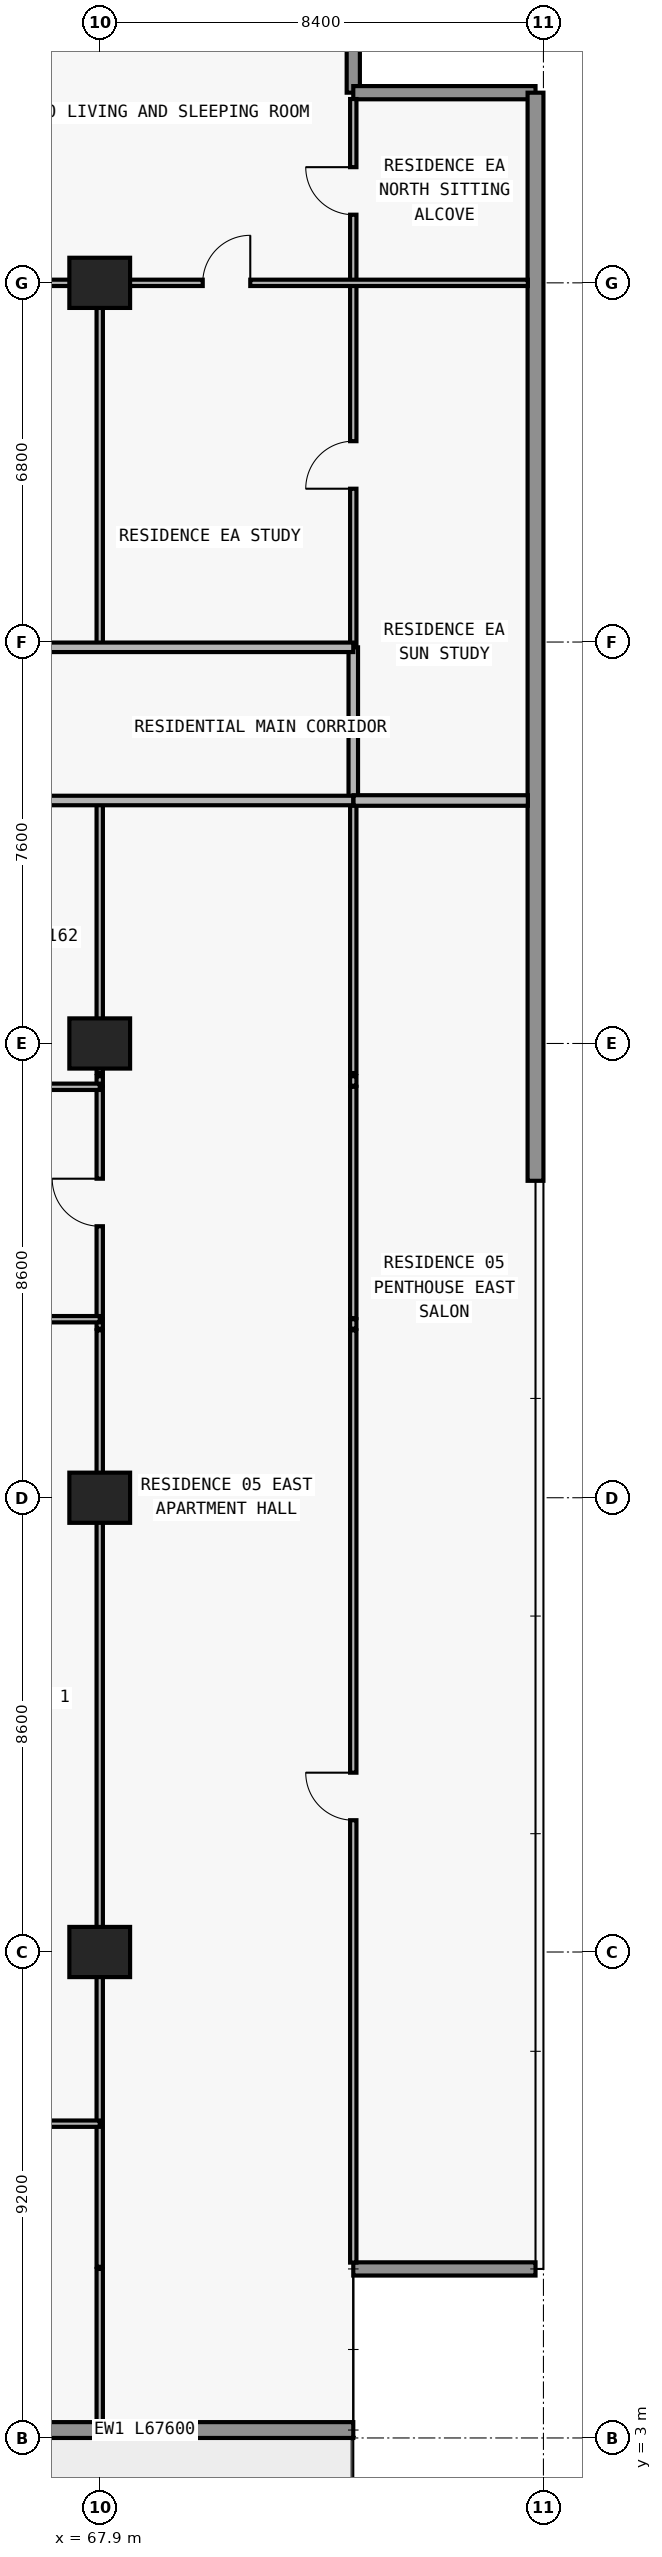
"""IFC4 building model, lengths in metres.
Left out: names, types, materials, properties, quantities, classifications, styles, units other than length and angle.
Written with IfcOpenShell. Run it as: python <this file> out.ifc"""

import sys

from ifc_helpers import new_model, si_unit, direction, frame, frame_2d, origin, origin_2d, place, context, subcontext, project, spatial, rectangle, extrude, element, fill, save


model = new_model("IFC4")
c1 = context("Model", 3, precision=1e-05, world=origin(), true_north=direction((0.0, 1.0)))
c2 = subcontext(c1, "Body", "Model", "MODEL_VIEW")
j1 = project(units=[si_unit("LENGTHUNIT", "METRE"), si_unit("PLANEANGLEUNIT", "RADIAN")], contexts=[c1])
p1 = place(None, origin())
s1 = spatial("IfcSite", under=j1, at=p1, CompositionType="ELEMENT")
p2 = place(p1, origin())
s2 = spatial("IfcBuilding", under=s1, at=p2, CompositionType="ELEMENT")
p3 = place(p2, frame((0.0, 0.0, 43.2)))
s3 = spatial("IfcBuildingStorey", under=s2, at=p3, CompositionType="ELEMENT", Elevation=43.2)
for number, where, z_axis, x_axis in (
    (1, (67.9, 12.2, 0.0), (0.0, 0.0, 1.0), (1.0, 0.0, 0.0)),
    (2, (67.9, 20.8, 0.0), (0.0, 0.0, 1.0), (1.0, 0.0, 0.0)),
    (3, (67.9, 29.4, 0.0), (0.0, 0.0, 1.0), (1.0, 0.0, 0.0)),
    (4, (67.9, 43.8, 0.0), (0.0, 0.0, 1.0), (1.0, 0.0, 0.0)),
):
    element("IfcColumn", number, at=place(p3, frame(where, z_axis=z_axis, x_axis=x_axis)), inside=s3, PredefinedType="COLUMN", context=c2, shape_type="SweptSolid", body=[
        extrude(rectangle(XDim=1.15, YDim=0.95, at=origin_2d()), origin(), (0.0, 0.0, 1.0), 3.05),
    ])
p4 = place(p3, frame((72.7, 3.15, 0.0), z_axis=(0.0, 0.0, 1.0), x_axis=(-1.0, 0.0, 0.0)))
e5 = element("IfcWall", 5, at=p4, inside=s3, PredefinedType="STANDARD", context=c2, shape_type="SweptSolid", body=[
    extrude(rectangle(XDim=67.6, YDim=0.3, at=frame_2d((33.8, 0.0))), origin(), (0.0, 0.0, 1.0), 3.05),
])
p5 = place(p4, frame((59.89, 0.0, 0.0)))
e6 = element("IfcOpeningElement", 6, at=p5, cuts=e5, PredefinedType="OPENING", context=c2, shape_type="SweptSolid", body=[
    extrude(rectangle(XDim=2.0, YDim=2.3, at=frame_2d((1.0, 1.15))), frame((0.0, 0.16, 0.0), z_axis=(0.0, -1.0, 0.0), x_axis=(1.0, 0.0, 0.0)), (0.0, 0.0, 1.0), 0.32),
])
p6 = place(p4, frame((55.21, 0.0, 0.65)))
e7 = element("IfcOpeningElement", 7, at=p6, cuts=e5, PredefinedType="OPENING", context=c2, shape_type="SweptSolid", body=[
    extrude(rectangle(XDim=2.6, YDim=1.85, at=frame_2d((1.3, 0.925))), frame((0.0, 0.16, 0.0), z_axis=(0.0, -1.0, 0.0), x_axis=(1.0, 0.0, 0.0)), (0.0, 0.0, 1.0), 0.32),
])
p7 = place(p4, frame((49.1, 0.0, 0.85)))
e8 = element("IfcOpeningElement", 8, at=p7, cuts=e5, PredefinedType="OPENING", context=c2, shape_type="SweptSolid", body=[
    extrude(rectangle(XDim=2.2, YDim=1.55, at=frame_2d((1.1, 0.775))), frame((0.0, 0.16, 0.0), z_axis=(0.0, -1.0, 0.0), x_axis=(1.0, 0.0, 0.0)), (0.0, 0.0, 1.0), 0.32),
])
p8 = place(p4, frame((42.69, 0.0, 0.0)))
e9 = element("IfcOpeningElement", 9, at=p8, cuts=e5, PredefinedType="OPENING", context=c2, shape_type="SweptSolid", body=[
    extrude(rectangle(XDim=2.0, YDim=2.3, at=frame_2d((1.0, 1.15))), frame((0.0, 0.16, 0.0), z_axis=(0.0, -1.0, 0.0), x_axis=(1.0, 0.0, 0.0)), (0.0, 0.0, 1.0), 0.32),
])
p9 = place(p4, frame((38.59, 0.0, 0.85)))
e10 = element("IfcOpeningElement", 10, at=p9, cuts=e5, PredefinedType="OPENING", context=c2, shape_type="SweptSolid", body=[
    extrude(rectangle(XDim=1.8, YDim=1.55, at=frame_2d((0.9, 0.775))), frame((0.0, 0.16, 0.0), z_axis=(0.0, -1.0, 0.0), x_axis=(1.0, 0.0, 0.0)), (0.0, 0.0, 1.0), 0.32),
])
p10 = place(p4, frame((30.914, 0.0, 0.85)))
e11 = element("IfcOpeningElement", 11, at=p10, cuts=e5, PredefinedType="OPENING", context=c2, shape_type="SweptSolid", body=[
    extrude(rectangle(XDim=2.2, YDim=1.55, at=frame_2d((1.1, 0.775))), frame((0.0, 0.16, 0.0), z_axis=(0.0, -1.0, 0.0), x_axis=(1.0, 0.0, 0.0)), (0.0, 0.0, 1.0), 0.32),
])
p11 = place(p4, frame((26.69, 0.0, 0.0)))
e12 = element("IfcOpeningElement", 12, at=p11, cuts=e5, PredefinedType="OPENING", context=c2, shape_type="SweptSolid", body=[
    extrude(rectangle(XDim=2.0, YDim=2.3, at=frame_2d((1.0, 1.15))), frame((0.0, 0.16, 0.0), z_axis=(0.0, -1.0, 0.0), x_axis=(1.0, 0.0, 0.0)), (0.0, 0.0, 1.0), 0.32),
])
p12 = place(p4, frame((22.59, 0.0, 0.85)))
e13 = element("IfcOpeningElement", 13, at=p12, cuts=e5, PredefinedType="OPENING", context=c2, shape_type="SweptSolid", body=[
    extrude(rectangle(XDim=1.8, YDim=1.55, at=frame_2d((0.9, 0.775))), frame((0.0, 0.16, 0.0), z_axis=(0.0, -1.0, 0.0), x_axis=(1.0, 0.0, 0.0)), (0.0, 0.0, 1.0), 0.32),
])
p13 = place(p4, frame((18.69, 0.0, 0.0)))
e14 = element("IfcOpeningElement", 14, at=p13, cuts=e5, PredefinedType="OPENING", context=c2, shape_type="SweptSolid", body=[
    extrude(rectangle(XDim=2.0, YDim=2.3, at=frame_2d((1.0, 1.15))), frame((0.0, 0.16, 0.0), z_axis=(0.0, -1.0, 0.0), x_axis=(1.0, 0.0, 0.0)), (0.0, 0.0, 1.0), 0.32),
])
p14 = place(p4, frame((14.01, 0.0, 0.65)))
e15 = element("IfcOpeningElement", 15, at=p14, cuts=e5, PredefinedType="OPENING", context=c2, shape_type="SweptSolid", body=[
    extrude(rectangle(XDim=2.6, YDim=1.85, at=frame_2d((1.3, 0.925))), frame((0.0, 0.16, 0.0), z_axis=(0.0, -1.0, 0.0), x_axis=(1.0, 0.0, 0.0)), (0.0, 0.0, 1.0), 0.32),
])
p15 = place(p4, frame((7.9, 0.0, 0.85)))
e16 = element("IfcOpeningElement", 16, at=p15, cuts=e5, PredefinedType="OPENING", context=c2, shape_type="SweptSolid", body=[
    extrude(rectangle(XDim=2.2, YDim=1.55, at=frame_2d((1.1, 0.775))), frame((0.0, 0.16, 0.0), z_axis=(0.0, -1.0, 0.0), x_axis=(1.0, 0.0, 0.0)), (0.0, 0.0, 1.0), 0.32),
])
p16 = place(p3, frame((72.7, 6.2, 0.0), z_axis=(0.0, 0.0, 1.0), x_axis=(1.0, 0.0, 0.0)))
e17 = element("IfcWall", 17, at=p16, inside=s3, PredefinedType="ELEMENTEDWALL", context=c2, shape_type="SweptSolid", body=[
    extrude(rectangle(XDim=3.45, YDim=0.25, at=frame_2d((1.725, 0.0))), origin(), (0.0, 0.0, 1.0), 3.05),
])
p17 = place(p3, frame((72.7, 50.45, 0.0), z_axis=(0.0, 0.0, 1.0), x_axis=(0.0, -1.0, 0.0)))
e18 = element("IfcWall", 18, at=p17, inside=s3, PredefinedType="ELEMENTEDWALL", context=c2, shape_type="SweptSolid", body=[
    extrude(rectangle(XDim=3.05, YDim=0.25, at=frame_2d((1.525, 0.0))), origin(), (0.0, 0.0, 1.0), 3.05),
])
p18 = place(p3, frame((72.7, 47.4, 0.0), z_axis=(0.0, 0.0, 1.0), x_axis=(1.0, 0.0, 0.0)))
e19 = element("IfcWall", 19, at=p18, inside=s3, PredefinedType="ELEMENTEDWALL", context=c2, shape_type="SweptSolid", body=[
    extrude(rectangle(XDim=3.45, YDim=0.25, at=frame_2d((1.725, 0.0))), origin(), (0.0, 0.0, 1.0), 3.05),
])
p19 = place(p3, frame((76.15, 47.4, 0.0), z_axis=(0.0, 0.0, 1.0), x_axis=(0.0, -1.0, 0.0)))
e20 = element("IfcWall", 20, at=p19, inside=s3, PredefinedType="STANDARD", context=c2, shape_type="SweptSolid", body=[
    extrude(rectangle(XDim=20.6, YDim=0.3, at=frame_2d((10.3, 0.0))), origin(), (0.0, 0.0, 1.0), 3.05),
])
p20 = place(p3, frame((67.9, 3.295, 0.0), z_axis=(0.0, 0.0, 1.0), x_axis=(0.0, 1.0, 0.0)))
e21 = element("IfcWall", 21, at=p20, inside=s3, PredefinedType="PARTITIONING", context=c2, shape_type="SweptSolid", body=[
    extrude(rectangle(XDim=2.905, YDim=0.12, at=frame_2d((1.453, 0.0))), origin(), (0.0, 0.0, 1.0), 3.05),
])
p21 = place(p3, frame((67.9, 6.24, 0.0), z_axis=(0.0, 0.0, 1.0), x_axis=(0.0, 1.0, 0.0)))
e22 = element("IfcWall", 22, at=p21, inside=s3, PredefinedType="PARTITIONING", context=c2, shape_type="SweptSolid", body=[
    extrude(rectangle(XDim=17.73, YDim=0.12, at=frame_2d((8.865, 0.0))), origin(), (0.0, 0.0, 1.0), 2.11),
])
p22 = place(p3, frame((67.9, 24.0, 0.0), z_axis=(0.0, 0.0, 1.0), x_axis=(0.0, 1.0, 0.0)))
e23 = element("IfcWall", 23, at=p22, inside=s3, PredefinedType="PARTITIONING", context=c2, shape_type="SweptSolid", body=[
    extrude(rectangle(XDim=0.18, YDim=0.12, at=frame_2d((0.09, 0.0))), origin(), (0.0, 0.0, 1.0), 2.11),
])
p23 = place(p3, frame((67.9, 24.2, 0.0), z_axis=(0.0, 0.0, 1.0), x_axis=(0.0, 1.0, 0.0)))
e24 = element("IfcWall", 24, at=p23, inside=s3, PredefinedType="PARTITIONING", context=c2, shape_type="SweptSolid", body=[
    extrude(rectangle(XDim=4.38, YDim=0.12, at=frame_2d((2.19, 0.0))), origin(), (0.0, 0.0, 1.0), 2.11),
])
p24 = place(p23, frame((1.74, 0.0, 0.0)))
e25 = element("IfcOpeningElement", 25, at=p24, cuts=e24, PredefinedType="OPENING", context=c2, shape_type="SweptSolid", body=[
    extrude(rectangle(XDim=0.9, YDim=2.06, at=frame_2d((0.45, 1.03))), frame((0.0, 0.07, 0.0), z_axis=(0.0, -1.0, 0.0), x_axis=(1.0, 0.0, 0.0)), (0.0, 0.0, 1.0), 0.14),
])
p25 = place(p3, frame((67.9, 28.6, 0.0), z_axis=(0.0, 0.0, 1.0), x_axis=(0.0, 1.0, 0.0)))
e26 = element("IfcWall", 26, at=p25, inside=s3, PredefinedType="PARTITIONING", context=c2, shape_type="SweptSolid", body=[
    extrude(rectangle(XDim=0.18, YDim=0.12, at=frame_2d((0.09, 0.0))), origin(), (0.0, 0.0, 1.0), 2.11),
])
p26 = place(p3, frame((67.9, 28.84, 0.0), z_axis=(0.0, 0.0, 1.0), x_axis=(0.0, 1.0, 0.0)))
e27 = element("IfcWall", 27, at=p26, inside=s3, PredefinedType="PARTITIONING", context=c2, shape_type="SweptSolid", body=[
    extrude(rectangle(XDim=5.16, YDim=0.12, at=frame_2d((2.58, 0.0))), origin(), (0.0, 0.0, 1.0), 2.11),
])
p27 = place(p3, frame((67.9, 36.9, 0.0), z_axis=(0.0, 0.0, 1.0), x_axis=(0.0, 1.0, 0.0)))
e28 = element("IfcWall", 28, at=p27, inside=s3, PredefinedType="PARTITIONING", context=c2, shape_type="SweptSolid", body=[
    extrude(rectangle(XDim=6.9, YDim=0.12, at=frame_2d((3.45, 0.0))), origin(), (0.0, 0.0, 1.0), 2.11),
])
p28 = place(p3, frame((72.7, 6.32, 0.0), z_axis=(0.0, 0.0, 1.0), x_axis=(0.0, 1.0, 0.0)))
e29 = element("IfcWall", 29, at=p28, inside=s3, PredefinedType="PARTITIONING", context=c2, shape_type="SweptSolid", body=[
    extrude(rectangle(XDim=17.65, YDim=0.12, at=frame_2d((8.825, 0.0))), origin(), (0.0, 0.0, 1.0), 3.05),
])
p29 = place(p28, frame((8.375, 0.0, 0.0)))
e30 = element("IfcOpeningElement", 30, at=p29, cuts=e29, PredefinedType="OPENING", context=c2, shape_type="SweptSolid", body=[
    extrude(rectangle(XDim=0.9, YDim=2.15, at=frame_2d((0.45, 1.075))), frame((0.0, 0.07, 0.0), z_axis=(0.0, -1.0, 0.0), x_axis=(1.0, 0.0, 0.0)), (0.0, 0.0, 1.0), 0.14),
])
p30 = place(p3, frame((72.7, 24.0, 0.0), z_axis=(0.0, 0.0, 1.0), x_axis=(0.0, 1.0, 0.0)))
e31 = element("IfcWall", 31, at=p30, inside=s3, PredefinedType="PARTITIONING", context=c2, shape_type="SweptSolid", body=[
    extrude(rectangle(XDim=0.18, YDim=0.12, at=frame_2d((0.09, 0.0))), origin(), (0.0, 0.0, 1.0), 3.05),
])
p31 = place(p3, frame((72.7, 24.2, 0.0), z_axis=(0.0, 0.0, 1.0), x_axis=(0.0, 1.0, 0.0)))
e32 = element("IfcWall", 32, at=p31, inside=s3, PredefinedType="PARTITIONING", context=c2, shape_type="SweptSolid", body=[
    extrude(rectangle(XDim=4.38, YDim=0.12, at=frame_2d((2.19, 0.0))), origin(), (0.0, 0.0, 1.0), 3.05),
])
p32 = place(p3, frame((72.7, 28.6, 0.0), z_axis=(0.0, 0.0, 1.0), x_axis=(0.0, 1.0, 0.0)))
e33 = element("IfcWall", 33, at=p32, inside=s3, PredefinedType="PARTITIONING", context=c2, shape_type="SweptSolid", body=[
    extrude(rectangle(XDim=0.18, YDim=0.12, at=frame_2d((0.09, 0.0))), origin(), (0.0, 0.0, 1.0), 3.05),
])
p33 = place(p3, frame((72.7, 28.84, 0.0), z_axis=(0.0, 0.0, 1.0), x_axis=(0.0, 1.0, 0.0)))
e34 = element("IfcWall", 34, at=p33, inside=s3, PredefinedType="PARTITIONING", context=c2, shape_type="SweptSolid", body=[
    extrude(rectangle(XDim=5.16, YDim=0.12, at=frame_2d((2.58, 0.0))), origin(), (0.0, 0.0, 1.0), 3.05),
])
p34 = place(p3, frame((72.7, 34.005, 0.0), z_axis=(0.0, 0.0, 1.0), x_axis=(0.0, 1.0, 0.0)))
e35 = element("IfcWall", 35, at=p34, inside=s3, PredefinedType="PARTITIONING", context=c2, shape_type="SweptSolid", body=[
    extrude(rectangle(XDim=2.895, YDim=0.18, at=frame_2d((1.448, 0.0))), origin(), (0.0, 0.0, 1.0), 3.05),
])
p35 = place(p3, frame((72.7, 36.905, 0.0), z_axis=(0.0, 0.0, 1.0), x_axis=(0.0, 1.0, 0.0)))
e36 = element("IfcWall", 36, at=p35, inside=s3, PredefinedType="PARTITIONING", context=c2, shape_type="SweptSolid", body=[
    extrude(rectangle(XDim=10.375, YDim=0.12, at=frame_2d((5.188, 0.0))), origin(), (0.0, 0.0, 1.0), 3.05),
])
p36 = place(p35, frame((2.998, 0.0, 0.0)))
e37 = element("IfcOpeningElement", 37, at=p36, cuts=e36, PredefinedType="OPENING", context=c2, shape_type="SweptSolid", body=[
    extrude(rectangle(XDim=0.9, YDim=2.15, at=frame_2d((0.45, 1.075))), frame((0.0, 0.07, 0.0), z_axis=(0.0, -1.0, 0.0), x_axis=(1.0, 0.0, 0.0)), (0.0, 0.0, 1.0), 0.14),
])
p37 = place(p35, frame((8.185, 0.0, 0.0)))
e38 = element("IfcOpeningElement", 38, at=p37, cuts=e36, PredefinedType="OPENING", context=c2, shape_type="SweptSolid", body=[
    extrude(rectangle(XDim=0.9, YDim=2.15, at=frame_2d((0.45, 1.075))), frame((0.0, 0.07, 0.0), z_axis=(0.0, -1.0, 0.0), x_axis=(1.0, 0.0, 0.0)), (0.0, 0.0, 1.0), 0.14),
])
p38 = place(p3, frame((59.5, 8.95, 0.0), z_axis=(0.0, 0.0, 1.0), x_axis=(1.0, 0.0, 0.0)))
e39 = element("IfcWall", 39, at=p38, inside=s3, PredefinedType="PARTITIONING", context=c2, shape_type="SweptSolid", body=[
    extrude(rectangle(XDim=8.4, YDim=0.12, at=frame_2d((4.2, 0.0))), origin(), (0.0, 0.0, 1.0), 3.05),
])
p39 = place(p38, frame((3.75, 0.0, 0.0)))
e40 = element("IfcOpeningElement", 40, at=p39, cuts=e39, PredefinedType="OPENING", context=c2, shape_type="SweptSolid", body=[
    extrude(rectangle(XDim=0.9, YDim=2.15, at=frame_2d((0.45, 1.075))), frame((0.0, 0.07, 0.0), z_axis=(0.0, -1.0, 0.0), x_axis=(1.0, 0.0, 0.0)), (0.0, 0.0, 1.0), 0.14),
])
p40 = place(p3, frame((59.505, 24.18, 0.0), z_axis=(0.0, 0.0, 1.0), x_axis=(1.0, 0.0, 0.0)))
e41 = element("IfcWall", 41, at=p40, inside=s3, PredefinedType="PARTITIONING", context=c2, shape_type="SweptSolid", body=[
    extrude(rectangle(XDim=8.395, YDim=0.12, at=frame_2d((4.198, 0.0))), origin(), (0.0, 0.0, 1.0), 3.05),
])
p41 = place(p40, frame((3.748, 0.0, 0.0)))
e42 = element("IfcOpeningElement", 42, at=p41, cuts=e41, PredefinedType="OPENING", context=c2, shape_type="SweptSolid", body=[
    extrude(rectangle(XDim=0.9, YDim=2.15, at=frame_2d((0.45, 1.075))), frame((0.0, 0.07, 0.0), z_axis=(0.0, -1.0, 0.0), x_axis=(1.0, 0.0, 0.0)), (0.0, 0.0, 1.0), 0.14),
])
p42 = place(p3, frame((59.5, 28.58, 0.0), z_axis=(0.0, 0.0, 1.0), x_axis=(1.0, 0.0, 0.0)))
e43 = element("IfcWall", 43, at=p42, inside=s3, PredefinedType="PARTITIONING", context=c2, shape_type="SweptSolid", body=[
    extrude(rectangle(XDim=8.4, YDim=0.12, at=frame_2d((4.2, 0.0))), origin(), (0.0, 0.0, 1.0), 3.05),
])
p43 = place(p42, frame((2.865, 0.0, 0.0)))
e44 = element("IfcOpeningElement", 44, at=p43, cuts=e43, PredefinedType="OPENING", context=c2, shape_type="SweptSolid", body=[
    extrude(rectangle(XDim=0.9, YDim=2.15, at=frame_2d((0.45, 1.075))), frame((0.0, 0.07, 0.0), z_axis=(0.0, -1.0, 0.0), x_axis=(1.0, 0.0, 0.0)), (0.0, 0.0, 1.0), 0.14),
])
p44 = place(p3, frame((31.4, 34.0, 0.0), z_axis=(0.0, 0.0, 1.0), x_axis=(1.0, 0.0, 0.0)))
e45 = element("IfcWall", 45, at=p44, inside=s3, PredefinedType="PARTITIONING", context=c2, shape_type="SweptSolid", body=[
    extrude(rectangle(XDim=41.3, YDim=0.18, at=frame_2d((20.65, 0.0))), origin(), (0.0, 0.0, 1.0), 3.05),
])
p45 = place(p44, frame((6.07, 0.0, 0.0)))
e46 = element("IfcOpeningElement", 46, at=p45, cuts=e45, PredefinedType="OPENING", context=c2, shape_type="SweptSolid", body=[
    extrude(rectangle(XDim=1.0, YDim=2.2, at=frame_2d((0.5, 1.1))), frame((0.0, 0.1, 0.0), z_axis=(0.0, -1.0, 0.0), x_axis=(1.0, 0.0, 0.0)), (0.0, 0.0, 1.0), 0.2),
])
p46 = place(p44, frame((13.945, 0.0, 0.0)))
e47 = element("IfcOpeningElement", 47, at=p46, cuts=e45, PredefinedType="OPENING", context=c2, shape_type="SweptSolid", body=[
    extrude(rectangle(XDim=1.0, YDim=2.2, at=frame_2d((0.5, 1.1))), frame((0.0, 0.1, 0.0), z_axis=(0.0, -1.0, 0.0), x_axis=(1.0, 0.0, 0.0)), (0.0, 0.0, 1.0), 0.2),
])
p47 = place(p44, frame((22.414, 0.0, 0.0)))
e48 = element("IfcOpeningElement", 48, at=p47, cuts=e45, PredefinedType="OPENING", context=c2, shape_type="SweptSolid", body=[
    extrude(rectangle(XDim=1.0, YDim=2.2, at=frame_2d((0.5, 1.1))), frame((0.0, 0.1, 0.0), z_axis=(0.0, -1.0, 0.0), x_axis=(1.0, 0.0, 0.0)), (0.0, 0.0, 1.0), 0.2),
])
p48 = place(p3, frame((72.705, 34.0, 0.0), z_axis=(0.0, 0.0, 1.0), x_axis=(1.0, 0.0, 0.0)))
e49 = element("IfcWall", 49, at=p48, inside=s3, PredefinedType="PARTITIONING", context=c2, shape_type="SweptSolid", body=[
    extrude(rectangle(XDim=3.3, YDim=0.2, at=frame_2d((1.65, 0.0))), origin(), (0.0, 0.0, 1.0), 3.05),
])
p49 = place(p3, frame((60.055, 36.9, 0.0), z_axis=(0.0, 0.0, 1.0), x_axis=(1.0, 0.0, 0.0)))
e50 = element("IfcWall", 50, at=p49, inside=s3, PredefinedType="PARTITIONING", context=c2, shape_type="SweptSolid", body=[
    extrude(rectangle(XDim=12.645, YDim=0.18, at=frame_2d((6.323, 0.0))), origin(), (0.0, 0.0, 1.0), 3.05),
])
p50 = place(p49, frame((4.52, 0.0, 0.0)))
e51 = element("IfcOpeningElement", 51, at=p50, cuts=e50, PredefinedType="OPENING", context=c2, shape_type="SweptSolid", body=[
    extrude(rectangle(XDim=1.0, YDim=2.2, at=frame_2d((0.5, 1.1))), frame((0.0, 0.1, 0.0), z_axis=(0.0, -1.0, 0.0), x_axis=(1.0, 0.0, 0.0)), (0.0, 0.0, 1.0), 0.2),
])
p51 = place(p3, frame((60.045, 43.8, 0.0), z_axis=(0.0, 0.0, 1.0), x_axis=(1.0, 0.0, 0.0)))
e52 = element("IfcWall", 52, at=p51, inside=s3, PredefinedType="PARTITIONING", context=c2, shape_type="SweptSolid", body=[
    extrude(rectangle(XDim=15.96, YDim=0.12, at=frame_2d((7.98, 0.0))), origin(), (0.0, 0.0, 1.0), 2.339),
])
p52 = place(p51, frame((9.805, 0.0, 0.0)))
e53 = element("IfcOpeningElement", 53, at=p52, cuts=e52, PredefinedType="OPENING", context=c2, shape_type="SweptSolid", body=[
    extrude(rectangle(XDim=0.9, YDim=2.15, at=frame_2d((0.45, 1.075))), frame((0.0, 0.07, 0.0), z_axis=(0.0, -1.0, 0.0), x_axis=(1.0, 0.0, 0.0)), (0.0, 0.0, 1.0), 0.14),
])
p53 = place(p51, frame((4.58, 0.0, 0.0)))
e54 = element("IfcOpeningElement", 54, at=p53, cuts=e52, PredefinedType="OPENING", context=c2, shape_type="SweptSolid", body=[
    extrude(rectangle(XDim=0.9, YDim=2.15, at=frame_2d((0.45, 1.075))), frame((0.0, 0.07, 0.0), z_axis=(0.0, -1.0, 0.0), x_axis=(1.0, 0.0, 0.0)), (0.0, 0.0, 1.0), 0.14),
])
p54 = place(p51, frame((0.677, 0.0, 0.0)))
e55 = element("IfcOpeningElement", 55, at=p54, cuts=e52, PredefinedType="OPENING", context=c2, shape_type="SweptSolid", body=[
    extrude(rectangle(XDim=0.85, YDim=2.1, at=frame_2d((0.425, 1.05))), frame((0.0, 0.07, 0.0), z_axis=(0.0, -1.0, 0.0), x_axis=(1.0, 0.0, 0.0)), (0.0, 0.0, 1.0), 0.14),
])
p55 = place(p24, origin())
e56 = element("IfcDoor", 56, at=p55, inside=s3, OperationType="SINGLE_SWING_RIGHT", PredefinedType="DOOR", context=c2, shape_type="SweptSolid", body=[
    extrude(rectangle(XDim=0.9, YDim=2.06, at=frame_2d((0.45, 1.03))), frame((0.0, 0.025, 0.0), z_axis=(0.0, -1.0, 0.0), x_axis=(1.0, 0.0, 0.0)), (0.0, 0.0, 1.0), 0.05),
])
fill(e25, e56)
p56 = place(p29, origin())
e57 = element("IfcDoor", 57, at=p56, inside=s3, OperationType="SINGLE_SWING_RIGHT", PredefinedType="DOOR", context=c2, shape_type="SweptSolid", body=[
    extrude(rectangle(XDim=0.9, YDim=2.15, at=frame_2d((0.45, 1.075))), frame((0.0, 0.025, 0.0), z_axis=(0.0, -1.0, 0.0), x_axis=(1.0, 0.0, 0.0)), (0.0, 0.0, 1.0), 0.05),
])
fill(e30, e57)
p57 = place(p52, origin())
e58 = element("IfcDoor", 58, at=p57, inside=s3, OperationType="SINGLE_SWING_RIGHT", PredefinedType="DOOR", context=c2, shape_type="SweptSolid", body=[
    extrude(rectangle(XDim=0.9, YDim=2.15, at=frame_2d((0.45, 1.075))), frame((0.0, 0.025, 0.0), z_axis=(0.0, -1.0, 0.0), x_axis=(1.0, 0.0, 0.0)), (0.0, 0.0, 1.0), 0.05),
])
fill(e53, e58)
p58 = place(p36, origin())
e59 = element("IfcDoor", 59, at=p58, inside=s3, OperationType="SINGLE_SWING_LEFT", PredefinedType="DOOR", context=c2, shape_type="SweptSolid", body=[
    extrude(rectangle(XDim=0.9, YDim=2.15, at=frame_2d((0.45, 1.075))), frame((0.0, 0.025, 0.0), z_axis=(0.0, -1.0, 0.0), x_axis=(1.0, 0.0, 0.0)), (0.0, 0.0, 1.0), 0.05),
])
fill(e37, e59)
p59 = place(p37, origin())
e60 = element("IfcDoor", 60, at=p59, inside=s3, OperationType="SINGLE_SWING_RIGHT", PredefinedType="DOOR", context=c2, shape_type="SweptSolid", body=[
    extrude(rectangle(XDim=0.9, YDim=2.15, at=frame_2d((0.45, 1.075))), frame((0.0, 0.025, 0.0), z_axis=(0.0, -1.0, 0.0), x_axis=(1.0, 0.0, 0.0)), (0.0, 0.0, 1.0), 0.05),
])
fill(e38, e60)
save(model, sys.argv[1])
